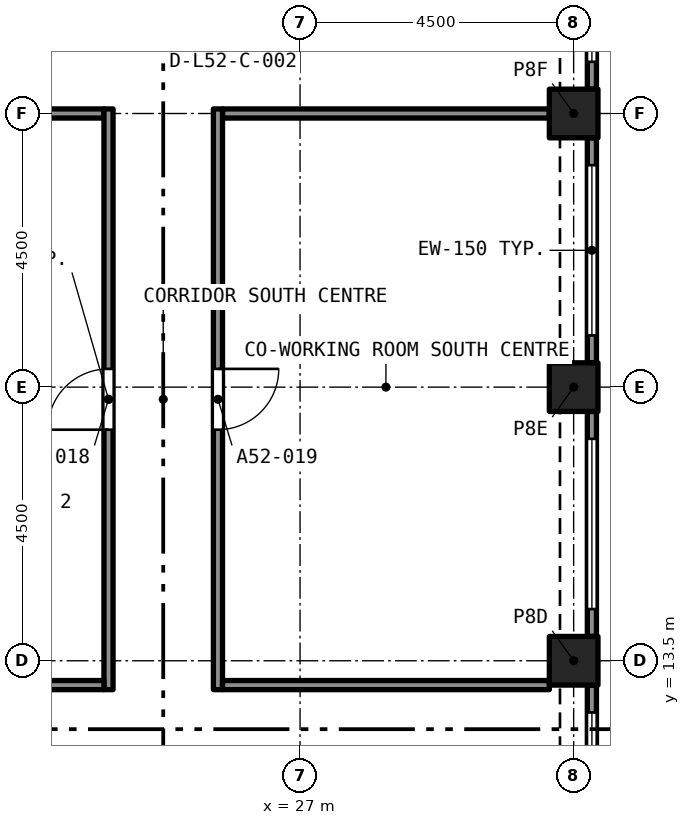
"""IFC4 building model, lengths in metres.
Left out: names, types, materials, properties, quantities, classifications, styles, units other than length and angle.
Written with IfcOpenShell. Run it as: python <this file> out.ifc"""

import sys

from ifc_helpers import new_model, si_unit, direction, frame, frame_2d, origin, origin_2d, place, context, subcontext, project, spatial, rectangle, extrude, element, fill, save


model = new_model("IFC4")
c1 = context("Model", 3, precision=1e-05, world=origin(), true_north=direction((0.0, 1.0)))
c2 = subcontext(c1, "Body", "Model", "MODEL_VIEW")
j1 = project(units=[si_unit("LENGTHUNIT", "METRE"), si_unit("PLANEANGLEUNIT", "RADIAN")], contexts=[c1])
p1 = place(None, origin())
s1 = spatial("IfcSite", under=j1, at=p1, CompositionType="ELEMENT")
p2 = place(p1, origin())
s2 = spatial("IfcBuilding", under=s1, at=p2, CompositionType="ELEMENT")
p3 = place(p2, frame((0.0, 0.0, 189.1)))
s3 = spatial("IfcBuildingStorey", under=s2, at=p3, CompositionType="ELEMENT", Elevation=189.1)
for number, where, z_axis, x_axis in (
    (1, (31.5, 13.5, 0.0), (0.0, 0.0, 1.0), (1.0, 0.0, 0.0)),
    (2, (31.5, 18.0, 0.0), (0.0, 0.0, 1.0), (1.0, 0.0, 0.0)),
    (3, (31.5, 22.5, 0.0), (0.0, 0.0, 1.0), (1.0, 0.0, 0.0)),
):
    element("IfcColumn", number, at=place(p3, frame(where, z_axis=z_axis, x_axis=x_axis)), inside=s3, PredefinedType="COLUMN", context=c2, shape_type="SweptSolid", body=[
        extrude(rectangle(XDim=0.8, YDim=0.8, at=origin_2d()), origin(), (0.0, 0.0, 1.0), 3.2),
    ])
p4 = place(p3, frame((31.8, 13.1, 0.0), z_axis=(0.0, 0.0, 1.0), x_axis=(0.0, -1.0, 0.0)))
e4 = element("IfcWall", 4, at=p4, inside=s3, PredefinedType="SOLIDWALL", context=c2, shape_type="SweptSolid", body=[
    extrude(rectangle(XDim=3.7, YDim=0.15, at=frame_2d((1.85, 0.0))), origin(), (0.0, 0.0, 1.0), 3.2),
])
p5 = place(p4, frame((0.45, 0.0, 0.45)))
e5 = element("IfcOpeningElement", 5, at=p5, cuts=e4, PredefinedType="OPENING", context=c2, shape_type="SweptSolid", body=[
    extrude(rectangle(XDim=2.8, YDim=1.95, at=frame_2d((1.4, 0.975))), frame((0.0, 0.085, 0.0), z_axis=(0.0, -1.0, 0.0), x_axis=(1.0, 0.0, 0.0)), (0.0, 0.0, 1.0), 0.17),
])
p6 = place(p3, frame((31.8, 17.6, 0.0), z_axis=(0.0, 0.0, 1.0), x_axis=(0.0, -1.0, 0.0)))
e6 = element("IfcWall", 6, at=p6, inside=s3, PredefinedType="SOLIDWALL", context=c2, shape_type="SweptSolid", body=[
    extrude(rectangle(XDim=3.7, YDim=0.15, at=frame_2d((1.85, 0.0))), origin(), (0.0, 0.0, 1.0), 3.2),
])
p7 = place(p6, frame((0.45, 0.0, 0.45)))
e7 = element("IfcOpeningElement", 7, at=p7, cuts=e6, PredefinedType="OPENING", context=c2, shape_type="SweptSolid", body=[
    extrude(rectangle(XDim=2.8, YDim=1.95, at=frame_2d((1.4, 0.975))), frame((0.0, 0.085, 0.0), z_axis=(0.0, -1.0, 0.0), x_axis=(1.0, 0.0, 0.0)), (0.0, 0.0, 1.0), 0.17),
])
p8 = place(p3, frame((31.8, 22.1, 0.0), z_axis=(0.0, 0.0, 1.0), x_axis=(0.0, -1.0, 0.0)))
e8 = element("IfcWall", 8, at=p8, inside=s3, PredefinedType="SOLIDWALL", context=c2, shape_type="SweptSolid", body=[
    extrude(rectangle(XDim=3.7, YDim=0.15, at=frame_2d((1.85, 0.0))), origin(), (0.0, 0.0, 1.0), 3.2),
])
p9 = place(p8, frame((0.45, 0.0, 0.45)))
e9 = element("IfcOpeningElement", 9, at=p9, cuts=e8, PredefinedType="OPENING", context=c2, shape_type="SweptSolid", body=[
    extrude(rectangle(XDim=2.8, YDim=1.95, at=frame_2d((1.4, 0.975))), frame((0.0, 0.085, 0.0), z_axis=(0.0, -1.0, 0.0), x_axis=(1.0, 0.0, 0.0)), (0.0, 0.0, 1.0), 0.17),
])
p10 = place(p3, frame((31.8, 26.6, 0.0), z_axis=(0.0, 0.0, 1.0), x_axis=(0.0, -1.0, 0.0)))
e10 = element("IfcWall", 10, at=p10, inside=s3, PredefinedType="SOLIDWALL", context=c2, shape_type="SweptSolid", body=[
    extrude(rectangle(XDim=3.7, YDim=0.15, at=frame_2d((1.85, 0.0))), origin(), (0.0, 0.0, 1.0), 3.2),
])
p11 = place(p10, frame((0.45, 0.0, 0.45)))
e11 = element("IfcOpeningElement", 11, at=p11, cuts=e10, PredefinedType="OPENING", context=c2, shape_type="SweptSolid", body=[
    extrude(rectangle(XDim=2.8, YDim=1.95, at=frame_2d((1.4, 0.975))), frame((0.0, 0.085, 0.0), z_axis=(0.0, -1.0, 0.0), x_axis=(1.0, 0.0, 0.0)), (0.0, 0.0, 1.0), 0.17),
])
for number, where, z_axis, x_axis in (
    (12, (18.4, 22.5, 0.0), (0.0, 0.0, 1.0), (1.0, 0.0, 0.0)),
    (13, (25.725, 22.5, 0.0), (0.0, 0.0, 1.0), (1.0, 0.0, 0.0)),
):
    element("IfcWall", number, at=place(p3, frame(where, z_axis=z_axis, x_axis=x_axis)), inside=s3, PredefinedType="PARTITIONING", context=c2, shape_type="SweptSolid", body=[
        extrude(rectangle(XDim=5.375, YDim=0.15, at=frame_2d((2.688, 0.0))), origin(), (0.0, 0.0, 1.0), 2.75),
    ])
p12 = place(p3, frame((23.85, 13.025, 0.0), z_axis=(0.0, 0.0, 1.0), x_axis=(0.0, 1.0, 0.0)))
e14 = element("IfcWall", 14, at=p12, inside=s3, PredefinedType="PARTITIONING", context=c2, shape_type="SweptSolid", body=[
    extrude(rectangle(XDim=9.55, YDim=0.15, at=frame_2d((4.775, 0.0))), origin(), (0.0, 0.0, 1.0), 2.75),
])
p13 = place(p12, frame((4.275, 0.0, 0.0)))
e15 = element("IfcOpeningElement", 15, at=p13, cuts=e14, PredefinedType="OPENING", context=c2, shape_type="SweptSolid", body=[
    extrude(rectangle(XDim=1.0, YDim=2.1, at=frame_2d((0.5, 1.05))), frame((0.0, 0.085, 0.0), z_axis=(0.0, -1.0, 0.0), x_axis=(1.0, 0.0, 0.0)), (0.0, 0.0, 1.0), 0.17),
])
p14 = place(p3, frame((25.65, 22.575, 0.0), z_axis=(0.0, 0.0, 1.0), x_axis=(0.0, -1.0, 0.0)))
e16 = element("IfcWall", 16, at=p14, inside=s3, PredefinedType="PARTITIONING", context=c2, shape_type="SweptSolid", body=[
    extrude(rectangle(XDim=9.55, YDim=0.15, at=frame_2d((4.775, 0.0))), origin(), (0.0, 0.0, 1.0), 2.75),
])
p15 = place(p14, frame((4.275, 0.0, 0.0)))
e17 = element("IfcOpeningElement", 17, at=p15, cuts=e16, PredefinedType="OPENING", context=c2, shape_type="SweptSolid", body=[
    extrude(rectangle(XDim=1.0, YDim=2.1, at=frame_2d((0.5, 1.05))), frame((0.0, 0.085, 0.0), z_axis=(0.0, -1.0, 0.0), x_axis=(1.0, 0.0, 0.0)), (0.0, 0.0, 1.0), 0.17),
])
for number, where, z_axis, x_axis in (
    (18, (18.4, 13.1, 0.0), (0.0, 0.0, 1.0), (1.0, 0.0, 0.0)),
    (19, (25.725, 13.1, 0.0), (0.0, 0.0, 1.0), (1.0, 0.0, 0.0)),
):
    element("IfcWall", number, at=place(p3, frame(where, z_axis=z_axis, x_axis=x_axis)), inside=s3, PredefinedType="PARTITIONING", context=c2, shape_type="SweptSolid", body=[
        extrude(rectangle(XDim=5.375, YDim=0.15, at=frame_2d((2.688, 0.0))), origin(), (0.0, 0.0, 1.0), 2.75),
    ])
p16 = place(p5, origin())
e20 = element("IfcWindow", 20, at=p16, inside=s3, PartitioningType="SINGLE_PANEL", PredefinedType="WINDOW", context=c2, shape_type="SweptSolid", body=[
    extrude(rectangle(XDim=2.8, YDim=1.95, at=frame_2d((1.4, 0.975))), frame((0.0, 0.03, 0.0), z_axis=(0.0, -1.0, 0.0), x_axis=(1.0, 0.0, 0.0)), (0.0, 0.0, 1.0), 0.06),
])
fill(e5, e20)
p17 = place(p7, origin())
e21 = element("IfcWindow", 21, at=p17, inside=s3, PartitioningType="SINGLE_PANEL", PredefinedType="WINDOW", context=c2, shape_type="SweptSolid", body=[
    extrude(rectangle(XDim=2.8, YDim=1.95, at=frame_2d((1.4, 0.975))), frame((0.0, 0.03, 0.0), z_axis=(0.0, -1.0, 0.0), x_axis=(1.0, 0.0, 0.0)), (0.0, 0.0, 1.0), 0.06),
])
fill(e7, e21)
p18 = place(p9, origin())
e22 = element("IfcWindow", 22, at=p18, inside=s3, PartitioningType="SINGLE_PANEL", PredefinedType="WINDOW", context=c2, shape_type="SweptSolid", body=[
    extrude(rectangle(XDim=2.8, YDim=1.95, at=frame_2d((1.4, 0.975))), frame((0.0, 0.03, 0.0), z_axis=(0.0, -1.0, 0.0), x_axis=(1.0, 0.0, 0.0)), (0.0, 0.0, 1.0), 0.06),
])
fill(e9, e22)
p19 = place(p11, origin())
e23 = element("IfcWindow", 23, at=p19, inside=s3, PartitioningType="SINGLE_PANEL", PredefinedType="WINDOW", context=c2, shape_type="SweptSolid", body=[
    extrude(rectangle(XDim=2.8, YDim=1.95, at=frame_2d((1.4, 0.975))), frame((0.0, 0.03, 0.0), z_axis=(0.0, -1.0, 0.0), x_axis=(1.0, 0.0, 0.0)), (0.0, 0.0, 1.0), 0.06),
])
fill(e11, e23)
p20 = place(p13, origin())
e24 = element("IfcDoor", 24, at=p20, inside=s3, OperationType="SINGLE_SWING_RIGHT", PredefinedType="DOOR", context=c2, shape_type="SweptSolid", body=[
    extrude(rectangle(XDim=1.0, YDim=2.1, at=frame_2d((0.5, 1.05))), frame((0.0, 0.025, 0.0), z_axis=(0.0, -1.0, 0.0), x_axis=(1.0, 0.0, 0.0)), (0.0, 0.0, 1.0), 0.05),
])
fill(e15, e24)
p21 = place(p15, origin())
e25 = element("IfcDoor", 25, at=p21, inside=s3, OperationType="SINGLE_SWING_LEFT", PredefinedType="DOOR", context=c2, shape_type="SweptSolid", body=[
    extrude(rectangle(XDim=1.0, YDim=2.1, at=frame_2d((0.5, 1.05))), frame((0.0, 0.025, 0.0), z_axis=(0.0, -1.0, 0.0), x_axis=(1.0, 0.0, 0.0)), (0.0, 0.0, 1.0), 0.05),
])
fill(e17, e25)
save(model, sys.argv[1])
